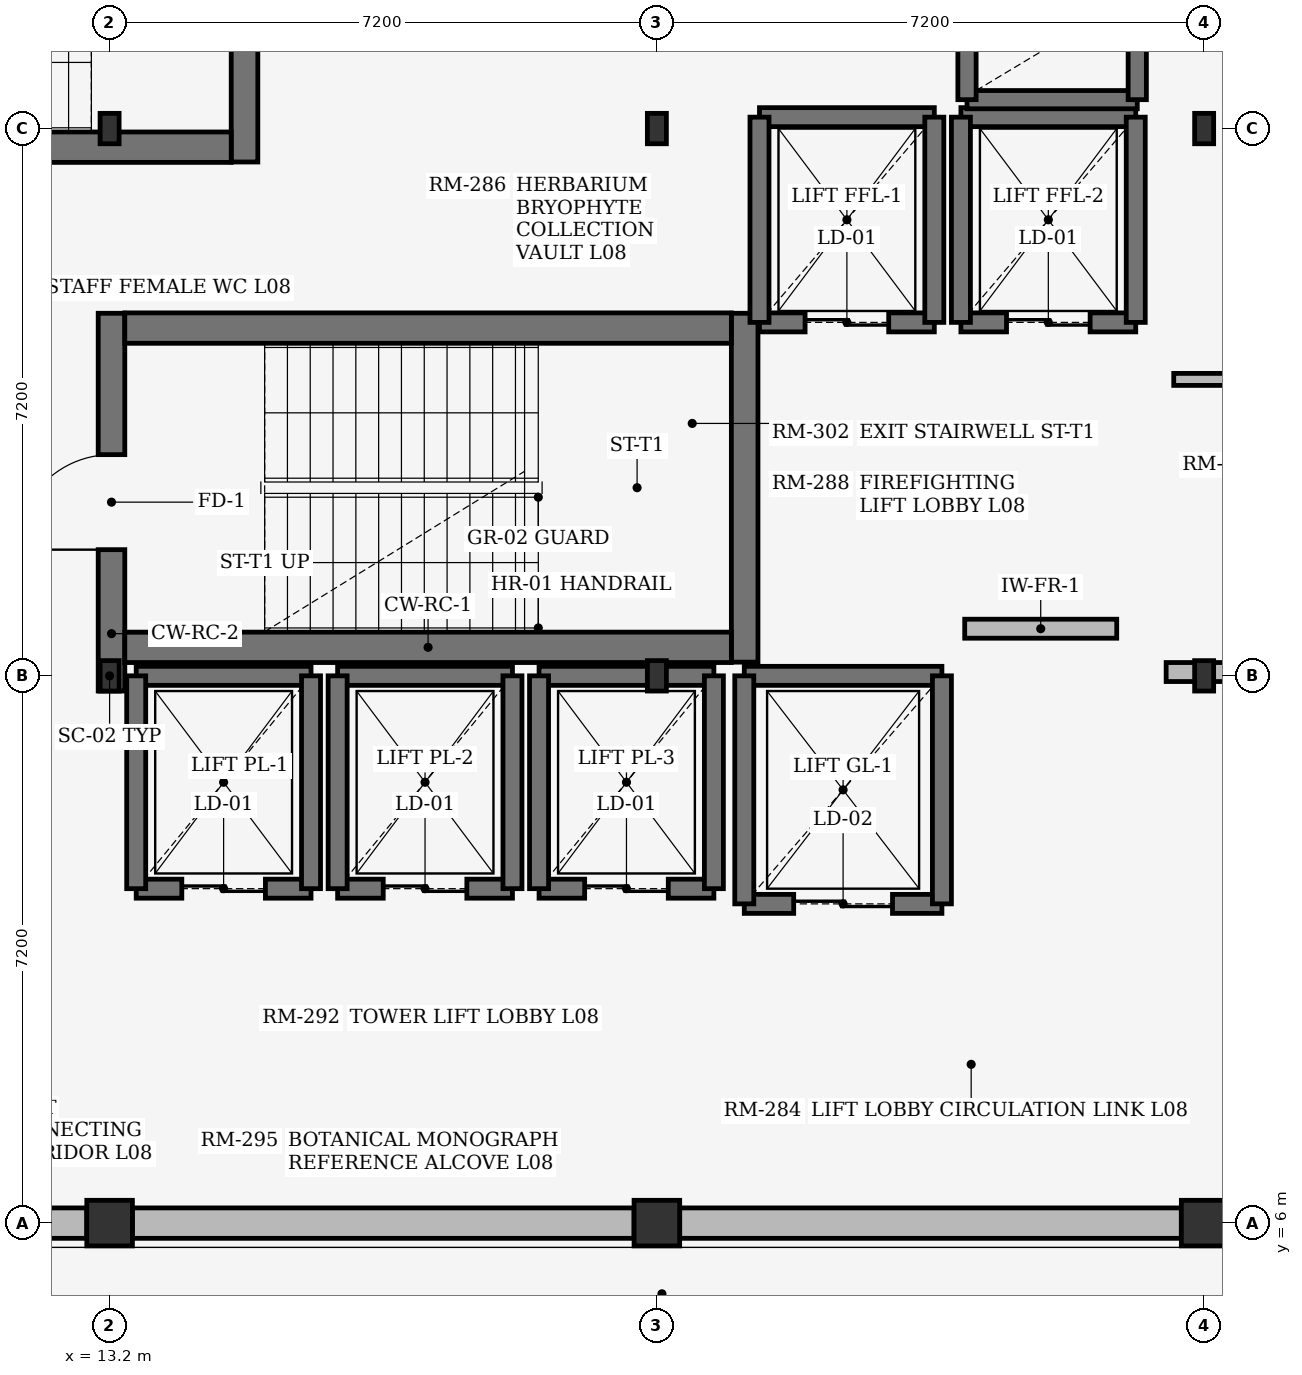
"""IFC4 building model, lengths in metres.
Left out: names, types, materials, properties, quantities, classifications, styles, units other than length and angle.
Written with IfcOpenShell. Run it as: python <this file> out.ifc"""

import sys

from ifc_helpers import new_model, si_unit, direction, frame, frame_2d, origin, origin_2d, place, context, subcontext, project, spatial, rectangle, i_section, extrude, element, fill, save


model = new_model("IFC4")
c1 = context("Model", 3, precision=1e-05, world=origin(), true_north=direction((0.0, 1.0)))
c2 = subcontext(c1, "Body", "Model", "MODEL_VIEW")
j1 = project(units=[si_unit("LENGTHUNIT", "METRE"), si_unit("PLANEANGLEUNIT", "RADIAN")], contexts=[c1])
p1 = place(None, origin())
s1 = spatial("IfcSite", under=j1, at=p1, CompositionType="ELEMENT")
p2 = place(p1, origin())
s2 = spatial("IfcBuilding", under=s1, at=p2, CompositionType="ELEMENT")
p3 = place(p2, frame((0.0, 0.0, 32.7)))
s3 = spatial("IfcBuildingStorey", under=s2, at=p3, CompositionType="ELEMENT", Elevation=32.7)
p4 = place(p3, frame((13.2, 6.0, 0.0), z_axis=(0.0, 0.0, 1.0), x_axis=(1.0, 0.0, 0.0)))
e1 = element("IfcColumn", 1, at=p4, inside=s3, PredefinedType="COLUMN", context=c2, shape_type="SweptSolid", body=[
    extrude(rectangle(XDim=0.6, YDim=0.6, at=origin_2d()), origin(), (0.0, 0.0, 1.0), 3.56),
])
for number, where, z_axis, x_axis in (
    (2, (13.2, 13.2, 0.0), (0.0, 0.0, 1.0), (1.0, 0.0, 0.0)),
    (3, (13.2, 20.4, 0.0), (0.0, 0.0, 1.0), (1.0, 0.0, 0.0)),
):
    element("IfcColumn", number, at=place(p3, frame(where, z_axis=z_axis, x_axis=x_axis)), inside=s3, PredefinedType="COLUMN", context=c2, shape_type="SweptSolid", body=[
        extrude(i_section(OverallWidth=0.25, OverallDepth=0.4, WebThickness=0.01, FlangeThickness=0.013, at=origin_2d()), origin(), (0.0, 0.0, 1.0), 3.56),
    ])
p5 = place(p3, frame((20.4, 6.0, 0.0), z_axis=(0.0, 0.0, 1.0), x_axis=(1.0, 0.0, 0.0)))
e4 = element("IfcColumn", 4, at=p5, inside=s3, PredefinedType="COLUMN", context=c2, shape_type="SweptSolid", body=[
    extrude(rectangle(XDim=0.6, YDim=0.6, at=origin_2d()), origin(), (0.0, 0.0, 1.0), 3.56),
])
for number, where, z_axis, x_axis in (
    (5, (20.4, 13.2, 0.0), (0.0, 0.0, 1.0), (1.0, 0.0, 0.0)),
    (6, (20.4, 20.4, 0.0), (0.0, 0.0, 1.0), (1.0, 0.0, 0.0)),
):
    element("IfcColumn", number, at=place(p3, frame(where, z_axis=z_axis, x_axis=x_axis)), inside=s3, PredefinedType="COLUMN", context=c2, shape_type="SweptSolid", body=[
        extrude(i_section(OverallWidth=0.25, OverallDepth=0.4, WebThickness=0.01, FlangeThickness=0.013, at=origin_2d()), origin(), (0.0, 0.0, 1.0), 3.56),
    ])
p6 = place(p3, frame((27.6, 6.0, 0.0), z_axis=(0.0, 0.0, 1.0), x_axis=(1.0, 0.0, 0.0)))
e7 = element("IfcColumn", 7, at=p6, inside=s3, PredefinedType="COLUMN", context=c2, shape_type="SweptSolid", body=[
    extrude(rectangle(XDim=0.6, YDim=0.6, at=origin_2d()), origin(), (0.0, 0.0, 1.0), 3.56),
])
for number, where, z_axis, x_axis in (
    (8, (27.6, 13.2, 0.0), (0.0, 0.0, 1.0), (1.0, 0.0, 0.0)),
    (9, (27.6, 20.4, 0.0), (0.0, 0.0, 1.0), (1.0, 0.0, 0.0)),
):
    element("IfcColumn", number, at=place(p3, frame(where, z_axis=z_axis, x_axis=x_axis)), inside=s3, PredefinedType="COLUMN", context=c2, shape_type="SweptSolid", body=[
        extrude(i_section(OverallWidth=0.25, OverallDepth=0.4, WebThickness=0.01, FlangeThickness=0.013, at=origin_2d()), origin(), (0.0, 0.0, 1.0), 3.56),
    ])
p7 = place(p3, frame((6.3, 6.0, 0.0), z_axis=(0.0, 0.0, 1.0), x_axis=(1.0, 0.0, 0.0)))
e10 = element("IfcWall", 10, at=p7, inside=s3, PredefinedType="STANDARD", context=c2, shape_type="SweptSolid", body=[
    extrude(rectangle(XDim=6.6, YDim=0.4, at=frame_2d((3.3, 0.0))), origin(), (0.0, 0.0, 1.0), 3.04),
])
for number, where, z_axis, x_axis in (
    (11, (13.5, 6.0, 0.0), (0.0, 0.0, 1.0), (1.0, 0.0, 0.0)),
    (12, (20.7, 6.0, 0.0), (0.0, 0.0, 1.0), (1.0, 0.0, 0.0)),
):
    element("IfcWall", number, at=place(p3, frame(where, z_axis=z_axis, x_axis=x_axis)), inside=s3, PredefinedType="STANDARD", context=c2, shape_type="SweptSolid", body=[
        extrude(rectangle(XDim=6.6, YDim=0.4, at=frame_2d((3.3, 0.0))), origin(), (0.0, 0.0, 1.0), 3.04),
    ])
p8 = place(p3, frame((13.225, 13.0, 0.0), z_axis=(0.0, 0.0, 1.0), x_axis=(0.0, 1.0, 0.0)))
e13 = element("IfcWall", 13, at=p8, inside=s3, PredefinedType="SHEAR", context=c2, shape_type="SweptSolid", body=[
    extrude(rectangle(XDim=4.97, YDim=0.35, at=frame_2d((2.485, 0.0))), origin(), (0.0, 0.0, 1.0), 3.56),
])
p9 = place(p8, frame((1.86, 0.0, 0.0)))
e14 = element("IfcOpeningElement", 14, at=p9, cuts=e13, PredefinedType="OPENING", context=c2, shape_type="SweptSolid", body=[
    extrude(rectangle(XDim=1.25, YDim=2.2, at=frame_2d((0.625, 1.1))), frame((0.0, 0.185, 0.0), z_axis=(0.0, -1.0, 0.0), x_axis=(1.0, 0.0, 0.0)), (0.0, 0.0, 1.0), 0.37),
])
p10 = place(p3, frame((21.555, 13.38, 0.0), z_axis=(0.0, 0.0, 1.0), x_axis=(0.0, 1.0, 0.0)))
e15 = element("IfcWall", 15, at=p10, inside=s3, PredefinedType="SHEAR", context=c2, shape_type="SweptSolid", body=[
    extrude(rectangle(XDim=4.59, YDim=0.35, at=frame_2d((2.295, 0.0))), origin(), (0.0, 0.0, 1.0), 3.56),
])
for number, where, z_axis, x_axis in (
    (16, (13.4, 13.575, 0.0), (0.0, 0.0, 1.0), (1.0, 0.0, 0.0)),
    (17, (13.4, 17.775, 0.0), (0.0, 0.0, 1.0), (1.0, 0.0, 0.0)),
):
    element("IfcWall", number, at=place(p3, frame(where, z_axis=z_axis, x_axis=x_axis)), inside=s3, PredefinedType="SHEAR", context=c2, shape_type="SweptSolid", body=[
        extrude(rectangle(XDim=7.98, YDim=0.4, at=frame_2d((3.99, 0.0))), origin(), (0.0, 0.0, 1.0), 3.56),
    ])
p11 = place(p3, frame((14.975, 24.55, 0.0), z_axis=(0.0, 0.0, 1.0), x_axis=(0.0, -1.0, 0.0)))
e18 = element("IfcWall", 18, at=p11, inside=s3, PredefinedType="SHEAR", context=c2, shape_type="SweptSolid", body=[
    extrude(rectangle(XDim=4.59, YDim=0.35, at=frame_2d((2.295, 0.0))), origin(), (0.0, 0.0, 1.0), 3.56),
])
p12 = place(p11, frame((1.72, 0.0, 0.0)))
e19 = element("IfcOpeningElement", 19, at=p12, cuts=e18, PredefinedType="OPENING", context=c2, shape_type="SweptSolid", body=[
    extrude(rectangle(XDim=1.15, YDim=2.2, at=frame_2d((0.575, 1.1))), frame((0.0, 0.185, 0.0), z_axis=(0.0, -1.0, 0.0), x_axis=(1.0, 0.0, 0.0)), (0.0, 0.0, 1.0), 0.37),
])
p13 = place(p3, frame((14.8, 20.155, 0.0), z_axis=(0.0, 0.0, 1.0), x_axis=(-1.0, 0.0, 0.0)))
e20 = element("IfcWall", 20, at=p13, inside=s3, PredefinedType="SHEAR", context=c2, shape_type="SweptSolid", body=[
    extrude(rectangle(XDim=7.98, YDim=0.4, at=frame_2d((3.99, 0.0))), origin(), (0.0, 0.0, 1.0), 3.56),
])
p14 = place(p3, frame((21.75, 17.85, 0.0), z_axis=(0.0, 0.0, 1.0), x_axis=(1.0, 0.0, 0.0)))
e21 = element("IfcWall", 21, at=p14, inside=s3, PredefinedType="SHEAR", context=c2, shape_type="SweptSolid", body=[
    extrude(rectangle(XDim=2.3, YDim=0.25, at=frame_2d((1.15, 0.0))), origin(), (0.0, 0.0, 1.0), 3.56),
])
p15 = place(p14, frame((0.6, 0.0, 0.0)))
e22 = element("IfcOpeningElement", 22, at=p15, cuts=e21, PredefinedType="OPENING", context=c2, shape_type="SweptSolid", body=[
    extrude(rectangle(XDim=1.1, YDim=2.2, at=frame_2d((0.55, 1.1))), frame((0.0, 0.135, 0.0), z_axis=(0.0, -1.0, 0.0), x_axis=(1.0, 0.0, 0.0)), (0.0, 0.0, 1.0), 0.27),
])
p16 = place(p3, frame((21.75, 20.55, 0.0), z_axis=(0.0, 0.0, 1.0), x_axis=(1.0, 0.0, 0.0)))
e23 = element("IfcWall", 23, at=p16, inside=s3, PredefinedType="SHEAR", context=c2, shape_type="SweptSolid", body=[
    extrude(rectangle(XDim=2.3, YDim=0.25, at=frame_2d((1.15, 0.0))), origin(), (0.0, 0.0, 1.0), 3.56),
])
for number, where, z_axis, x_axis in (
    (24, (21.75, 17.85, 0.0), (0.0, 0.0, 1.0), (0.0, 1.0, 0.0)),
    (25, (24.05, 17.85, 0.0), (0.0, 0.0, 1.0), (0.0, 1.0, 0.0)),
):
    element("IfcWall", number, at=place(p3, frame(where, z_axis=z_axis, x_axis=x_axis)), inside=s3, PredefinedType="SHEAR", context=c2, shape_type="SweptSolid", body=[
        extrude(rectangle(XDim=2.7, YDim=0.25, at=frame_2d((1.35, 0.0))), origin(), (0.0, 0.0, 1.0), 3.56),
    ])
p17 = place(p3, frame((24.4, 17.85, 0.0), z_axis=(0.0, 0.0, 1.0), x_axis=(1.0, 0.0, 0.0)))
e26 = element("IfcWall", 26, at=p17, inside=s3, PredefinedType="SHEAR", context=c2, shape_type="SweptSolid", body=[
    extrude(rectangle(XDim=2.3, YDim=0.25, at=frame_2d((1.15, 0.0))), origin(), (0.0, 0.0, 1.0), 3.56),
])
p18 = place(p17, frame((0.6, 0.0, 0.0)))
e27 = element("IfcOpeningElement", 27, at=p18, cuts=e26, PredefinedType="OPENING", context=c2, shape_type="SweptSolid", body=[
    extrude(rectangle(XDim=1.1, YDim=2.2, at=frame_2d((0.55, 1.1))), frame((0.0, 0.135, 0.0), z_axis=(0.0, -1.0, 0.0), x_axis=(1.0, 0.0, 0.0)), (0.0, 0.0, 1.0), 0.27),
])
p19 = place(p3, frame((24.4, 20.55, 0.0), z_axis=(0.0, 0.0, 1.0), x_axis=(1.0, 0.0, 0.0)))
e28 = element("IfcWall", 28, at=p19, inside=s3, PredefinedType="SHEAR", context=c2, shape_type="SweptSolid", body=[
    extrude(rectangle(XDim=2.3, YDim=0.25, at=frame_2d((1.15, 0.0))), origin(), (0.0, 0.0, 1.0), 3.56),
])
for number, where, z_axis, x_axis in (
    (29, (24.4, 17.85, 0.0), (0.0, 0.0, 1.0), (0.0, 1.0, 0.0)),
    (30, (26.7, 17.85, 0.0), (0.0, 0.0, 1.0), (0.0, 1.0, 0.0)),
):
    element("IfcWall", number, at=place(p3, frame(where, z_axis=z_axis, x_axis=x_axis)), inside=s3, PredefinedType="SHEAR", context=c2, shape_type="SweptSolid", body=[
        extrude(rectangle(XDim=2.7, YDim=0.25, at=frame_2d((1.35, 0.0))), origin(), (0.0, 0.0, 1.0), 3.56),
    ])
p20 = place(p3, frame((13.55, 10.4, 0.0), z_axis=(0.0, 0.0, 1.0), x_axis=(1.0, 0.0, 0.0)))
e31 = element("IfcWall", 31, at=p20, inside=s3, PredefinedType="SHEAR", context=c2, shape_type="SweptSolid", body=[
    extrude(rectangle(XDim=2.3, YDim=0.25, at=frame_2d((1.15, 0.0))), origin(), (0.0, 0.0, 1.0), 3.56),
])
p21 = place(p20, frame((0.6, 0.0, 0.0)))
e32 = element("IfcOpeningElement", 32, at=p21, cuts=e31, PredefinedType="OPENING", context=c2, shape_type="SweptSolid", body=[
    extrude(rectangle(XDim=1.1, YDim=2.2, at=frame_2d((0.55, 1.1))), frame((0.0, 0.135, 0.0), z_axis=(0.0, -1.0, 0.0), x_axis=(1.0, 0.0, 0.0)), (0.0, 0.0, 1.0), 0.27),
])
p22 = place(p3, frame((13.55, 13.2, 0.0), z_axis=(0.0, 0.0, 1.0), x_axis=(1.0, 0.0, 0.0)))
e33 = element("IfcWall", 33, at=p22, inside=s3, PredefinedType="SHEAR", context=c2, shape_type="SweptSolid", body=[
    extrude(rectangle(XDim=2.3, YDim=0.25, at=frame_2d((1.15, 0.0))), origin(), (0.0, 0.0, 1.0), 3.56),
])
for number, where, z_axis, x_axis in (
    (34, (13.55, 10.4, 0.0), (0.0, 0.0, 1.0), (0.0, 1.0, 0.0)),
    (35, (15.85, 10.4, 0.0), (0.0, 0.0, 1.0), (0.0, 1.0, 0.0)),
):
    element("IfcWall", number, at=place(p3, frame(where, z_axis=z_axis, x_axis=x_axis)), inside=s3, PredefinedType="SHEAR", context=c2, shape_type="SweptSolid", body=[
        extrude(rectangle(XDim=2.8, YDim=0.25, at=frame_2d((1.4, 0.0))), origin(), (0.0, 0.0, 1.0), 3.56),
    ])
p23 = place(p3, frame((16.2, 10.4, 0.0), z_axis=(0.0, 0.0, 1.0), x_axis=(1.0, 0.0, 0.0)))
e36 = element("IfcWall", 36, at=p23, inside=s3, PredefinedType="SHEAR", context=c2, shape_type="SweptSolid", body=[
    extrude(rectangle(XDim=2.3, YDim=0.25, at=frame_2d((1.15, 0.0))), origin(), (0.0, 0.0, 1.0), 3.56),
])
p24 = place(p23, frame((0.6, 0.0, 0.0)))
e37 = element("IfcOpeningElement", 37, at=p24, cuts=e36, PredefinedType="OPENING", context=c2, shape_type="SweptSolid", body=[
    extrude(rectangle(XDim=1.1, YDim=2.2, at=frame_2d((0.55, 1.1))), frame((0.0, 0.135, 0.0), z_axis=(0.0, -1.0, 0.0), x_axis=(1.0, 0.0, 0.0)), (0.0, 0.0, 1.0), 0.27),
])
p25 = place(p3, frame((16.2, 13.2, 0.0), z_axis=(0.0, 0.0, 1.0), x_axis=(1.0, 0.0, 0.0)))
e38 = element("IfcWall", 38, at=p25, inside=s3, PredefinedType="SHEAR", context=c2, shape_type="SweptSolid", body=[
    extrude(rectangle(XDim=2.3, YDim=0.25, at=frame_2d((1.15, 0.0))), origin(), (0.0, 0.0, 1.0), 3.56),
])
for number, where, z_axis, x_axis in (
    (39, (16.2, 10.4, 0.0), (0.0, 0.0, 1.0), (0.0, 1.0, 0.0)),
    (40, (18.5, 10.4, 0.0), (0.0, 0.0, 1.0), (0.0, 1.0, 0.0)),
):
    element("IfcWall", number, at=place(p3, frame(where, z_axis=z_axis, x_axis=x_axis)), inside=s3, PredefinedType="SHEAR", context=c2, shape_type="SweptSolid", body=[
        extrude(rectangle(XDim=2.8, YDim=0.25, at=frame_2d((1.4, 0.0))), origin(), (0.0, 0.0, 1.0), 3.56),
    ])
p26 = place(p3, frame((18.85, 10.4, 0.0), z_axis=(0.0, 0.0, 1.0), x_axis=(1.0, 0.0, 0.0)))
e41 = element("IfcWall", 41, at=p26, inside=s3, PredefinedType="SHEAR", context=c2, shape_type="SweptSolid", body=[
    extrude(rectangle(XDim=2.3, YDim=0.25, at=frame_2d((1.15, 0.0))), origin(), (0.0, 0.0, 1.0), 3.56),
])
p27 = place(p26, frame((0.6, 0.0, 0.0)))
e42 = element("IfcOpeningElement", 42, at=p27, cuts=e41, PredefinedType="OPENING", context=c2, shape_type="SweptSolid", body=[
    extrude(rectangle(XDim=1.1, YDim=2.2, at=frame_2d((0.55, 1.1))), frame((0.0, 0.135, 0.0), z_axis=(0.0, -1.0, 0.0), x_axis=(1.0, 0.0, 0.0)), (0.0, 0.0, 1.0), 0.27),
])
p28 = place(p3, frame((18.85, 13.2, 0.0), z_axis=(0.0, 0.0, 1.0), x_axis=(1.0, 0.0, 0.0)))
e43 = element("IfcWall", 43, at=p28, inside=s3, PredefinedType="SHEAR", context=c2, shape_type="SweptSolid", body=[
    extrude(rectangle(XDim=2.3, YDim=0.25, at=frame_2d((1.15, 0.0))), origin(), (0.0, 0.0, 1.0), 3.56),
])
for number, where, z_axis, x_axis in (
    (44, (18.85, 10.4, 0.0), (0.0, 0.0, 1.0), (0.0, 1.0, 0.0)),
    (45, (21.15, 10.4, 0.0), (0.0, 0.0, 1.0), (0.0, 1.0, 0.0)),
):
    element("IfcWall", number, at=place(p3, frame(where, z_axis=z_axis, x_axis=x_axis)), inside=s3, PredefinedType="SHEAR", context=c2, shape_type="SweptSolid", body=[
        extrude(rectangle(XDim=2.8, YDim=0.25, at=frame_2d((1.4, 0.0))), origin(), (0.0, 0.0, 1.0), 3.56),
    ])
p29 = place(p3, frame((21.55, 10.2, 0.0), z_axis=(0.0, 0.0, 1.0), x_axis=(1.0, 0.0, 0.0)))
e46 = element("IfcWall", 46, at=p29, inside=s3, PredefinedType="SHEAR", context=c2, shape_type="SweptSolid", body=[
    extrude(rectangle(XDim=2.6, YDim=0.25, at=frame_2d((1.3, 0.0))), origin(), (0.0, 0.0, 1.0), 3.56),
])
p30 = place(p29, frame((0.65, 0.0, 0.0)))
e47 = element("IfcOpeningElement", 47, at=p30, cuts=e46, PredefinedType="OPENING", context=c2, shape_type="SweptSolid", body=[
    extrude(rectangle(XDim=1.3, YDim=2.25, at=frame_2d((0.65, 1.125))), frame((0.0, 0.135, 0.0), z_axis=(0.0, -1.0, 0.0), x_axis=(1.0, 0.0, 0.0)), (0.0, 0.0, 1.0), 0.27),
])
p31 = place(p3, frame((21.55, 13.2, 0.0), z_axis=(0.0, 0.0, 1.0), x_axis=(1.0, 0.0, 0.0)))
e48 = element("IfcWall", 48, at=p31, inside=s3, PredefinedType="SHEAR", context=c2, shape_type="SweptSolid", body=[
    extrude(rectangle(XDim=2.6, YDim=0.25, at=frame_2d((1.3, 0.0))), origin(), (0.0, 0.0, 1.0), 3.56),
])
for number, where, z_axis, x_axis in (
    (49, (21.55, 10.2, 0.0), (0.0, 0.0, 1.0), (0.0, 1.0, 0.0)),
    (50, (24.15, 10.2, 0.0), (0.0, 0.0, 1.0), (0.0, 1.0, 0.0)),
):
    element("IfcWall", number, at=place(p3, frame(where, z_axis=z_axis, x_axis=x_axis)), inside=s3, PredefinedType="SHEAR", context=c2, shape_type="SweptSolid", body=[
        extrude(rectangle(XDim=3.0, YDim=0.25, at=frame_2d((1.5, 0.0))), origin(), (0.0, 0.0, 1.0), 3.56),
    ])
p32 = place(p3, frame((24.48, 20.78, 0.0), z_axis=(0.0, 0.0, 1.0), x_axis=(1.0, 0.0, 0.0)))
e51 = element("IfcWall", 51, at=p32, inside=s3, PredefinedType="SHEAR", context=c2, shape_type="SweptSolid", body=[
    extrude(rectangle(XDim=2.24, YDim=0.24, at=frame_2d((1.12, 0.0))), origin(), (0.0, 0.0, 1.0), 3.56),
])
for number, where, z_axis, x_axis in (
    (52, (24.48, 20.78, 0.0), (0.0, 0.0, 1.0), (0.0, 1.0, 0.0)),
    (53, (26.72, 20.78, 0.0), (0.0, 0.0, 1.0), (0.0, 1.0, 0.0)),
):
    element("IfcWall", number, at=place(p3, frame(where, z_axis=z_axis, x_axis=x_axis)), inside=s3, PredefinedType="SHEAR", context=c2, shape_type="SweptSolid", body=[
        extrude(rectangle(XDim=2.94, YDim=0.24, at=frame_2d((1.47, 0.0))), origin(), (0.0, 0.0, 1.0), 3.56),
    ])
p33 = place(p3, frame((24.45, 13.82, 0.0), z_axis=(0.0, 0.0, 1.0), x_axis=(1.0, 0.0, 0.0)))
e54 = element("IfcWall", 54, at=p33, inside=s3, PredefinedType="SOLIDWALL", context=c2, shape_type="SweptSolid", body=[
    extrude(rectangle(XDim=2.0, YDim=0.25, at=frame_2d((1.0, 0.0))), origin(), (0.0, 0.0, 1.0), 3.54),
])
p34 = place(p3, frame((27.2, 17.1, 0.0), z_axis=(0.0, 0.0, 1.0), x_axis=(1.0, 0.0, 0.0)))
e55 = element("IfcWall", 55, at=p34, inside=s3, PredefinedType="PARTITIONING", context=c2, shape_type="SweptSolid", body=[
    extrude(rectangle(XDim=7.05, YDim=0.158, at=frame_2d((3.525, 0.0))), origin(), (0.0, 0.0, 1.0), 3.54),
])
p35 = place(p34, frame((3.0, 0.0, 0.0)))
e56 = element("IfcOpeningElement", 56, at=p35, cuts=e55, PredefinedType="OPENING", context=c2, shape_type="SweptSolid", body=[
    extrude(rectangle(XDim=1.05, YDim=2.15, at=frame_2d((0.525, 1.075))), frame((0.0, 0.089, 0.0), z_axis=(0.0, -1.0, 0.0), x_axis=(1.0, 0.0, 0.0)), (0.0, 0.0, 1.0), 0.178),
])
p36 = place(p3, frame((27.1, 13.25, 0.0), z_axis=(0.0, 0.0, 1.0), x_axis=(1.0, 0.0, 0.0)))
e57 = element("IfcWall", 57, at=p36, inside=s3, PredefinedType="SOLIDWALL", context=c2, shape_type="SweptSolid", body=[
    extrude(rectangle(XDim=7.4, YDim=0.25, at=frame_2d((3.7, 0.0))), origin(), (0.0, 0.0, 1.0), 3.05),
])
p37 = place(p36, frame((2.8, 0.0, 0.0)))
e58 = element("IfcOpeningElement", 58, at=p37, cuts=e57, PredefinedType="OPENING", context=c2, shape_type="SweptSolid", body=[
    extrude(rectangle(XDim=1.8, YDim=2.25, at=frame_2d((0.9, 1.125))), frame((0.0, 0.135, 0.0), z_axis=(0.0, -1.0, 0.0), x_axis=(1.0, 0.0, 0.0)), (0.0, 0.0, 1.0), 0.27),
])
p38 = place(p9, origin())
e59 = element("IfcDoor", 59, at=p38, inside=s3, OperationType="SINGLE_SWING_LEFT", PredefinedType="DOOR", context=c2, shape_type="SweptSolid", body=[
    extrude(rectangle(XDim=1.25, YDim=2.2, at=frame_2d((0.625, 1.1))), frame((0.0, 0.025, 0.0), z_axis=(0.0, -1.0, 0.0), x_axis=(1.0, 0.0, 0.0)), (0.0, 0.0, 1.0), 0.05),
])
fill(e14, e59)
p39 = place(p15, origin())
e60 = element("IfcDoor", 60, at=p39, inside=s3, OperationType="DOUBLE_DOOR_SLIDING", PredefinedType="DOOR", context=c2, shape_type="SweptSolid", body=[
    extrude(rectangle(XDim=1.1, YDim=2.2, at=frame_2d((0.55, 1.1))), frame((0.0, 0.025, 0.0), z_axis=(0.0, -1.0, 0.0), x_axis=(1.0, 0.0, 0.0)), (0.0, 0.0, 1.0), 0.05),
])
fill(e22, e60)
p40 = place(p18, origin())
e61 = element("IfcDoor", 61, at=p40, inside=s3, OperationType="DOUBLE_DOOR_SLIDING", PredefinedType="DOOR", context=c2, shape_type="SweptSolid", body=[
    extrude(rectangle(XDim=1.1, YDim=2.2, at=frame_2d((0.55, 1.1))), frame((0.0, 0.025, 0.0), z_axis=(0.0, -1.0, 0.0), x_axis=(1.0, 0.0, 0.0)), (0.0, 0.0, 1.0), 0.05),
])
fill(e27, e61)
p41 = place(p21, origin())
e62 = element("IfcDoor", 62, at=p41, inside=s3, OperationType="DOUBLE_DOOR_SLIDING", PredefinedType="DOOR", context=c2, shape_type="SweptSolid", body=[
    extrude(rectangle(XDim=1.1, YDim=2.2, at=frame_2d((0.55, 1.1))), frame((0.0, 0.025, 0.0), z_axis=(0.0, -1.0, 0.0), x_axis=(1.0, 0.0, 0.0)), (0.0, 0.0, 1.0), 0.05),
])
fill(e32, e62)
p42 = place(p24, origin())
e63 = element("IfcDoor", 63, at=p42, inside=s3, OperationType="DOUBLE_DOOR_SLIDING", PredefinedType="DOOR", context=c2, shape_type="SweptSolid", body=[
    extrude(rectangle(XDim=1.1, YDim=2.2, at=frame_2d((0.55, 1.1))), frame((0.0, 0.025, 0.0), z_axis=(0.0, -1.0, 0.0), x_axis=(1.0, 0.0, 0.0)), (0.0, 0.0, 1.0), 0.05),
])
fill(e37, e63)
p43 = place(p27, origin())
e64 = element("IfcDoor", 64, at=p43, inside=s3, OperationType="DOUBLE_DOOR_SLIDING", PredefinedType="DOOR", context=c2, shape_type="SweptSolid", body=[
    extrude(rectangle(XDim=1.1, YDim=2.2, at=frame_2d((0.55, 1.1))), frame((0.0, 0.025, 0.0), z_axis=(0.0, -1.0, 0.0), x_axis=(1.0, 0.0, 0.0)), (0.0, 0.0, 1.0), 0.05),
])
fill(e42, e64)
p44 = place(p30, origin())
e65 = element("IfcDoor", 65, at=p44, inside=s3, OperationType="DOUBLE_DOOR_SLIDING", PredefinedType="DOOR", context=c2, shape_type="SweptSolid", body=[
    extrude(rectangle(XDim=1.3, YDim=2.25, at=frame_2d((0.65, 1.125))), frame((0.0, 0.025, 0.0), z_axis=(0.0, -1.0, 0.0), x_axis=(1.0, 0.0, 0.0)), (0.0, 0.0, 1.0), 0.05),
])
fill(e47, e65)
save(model, sys.argv[1])
